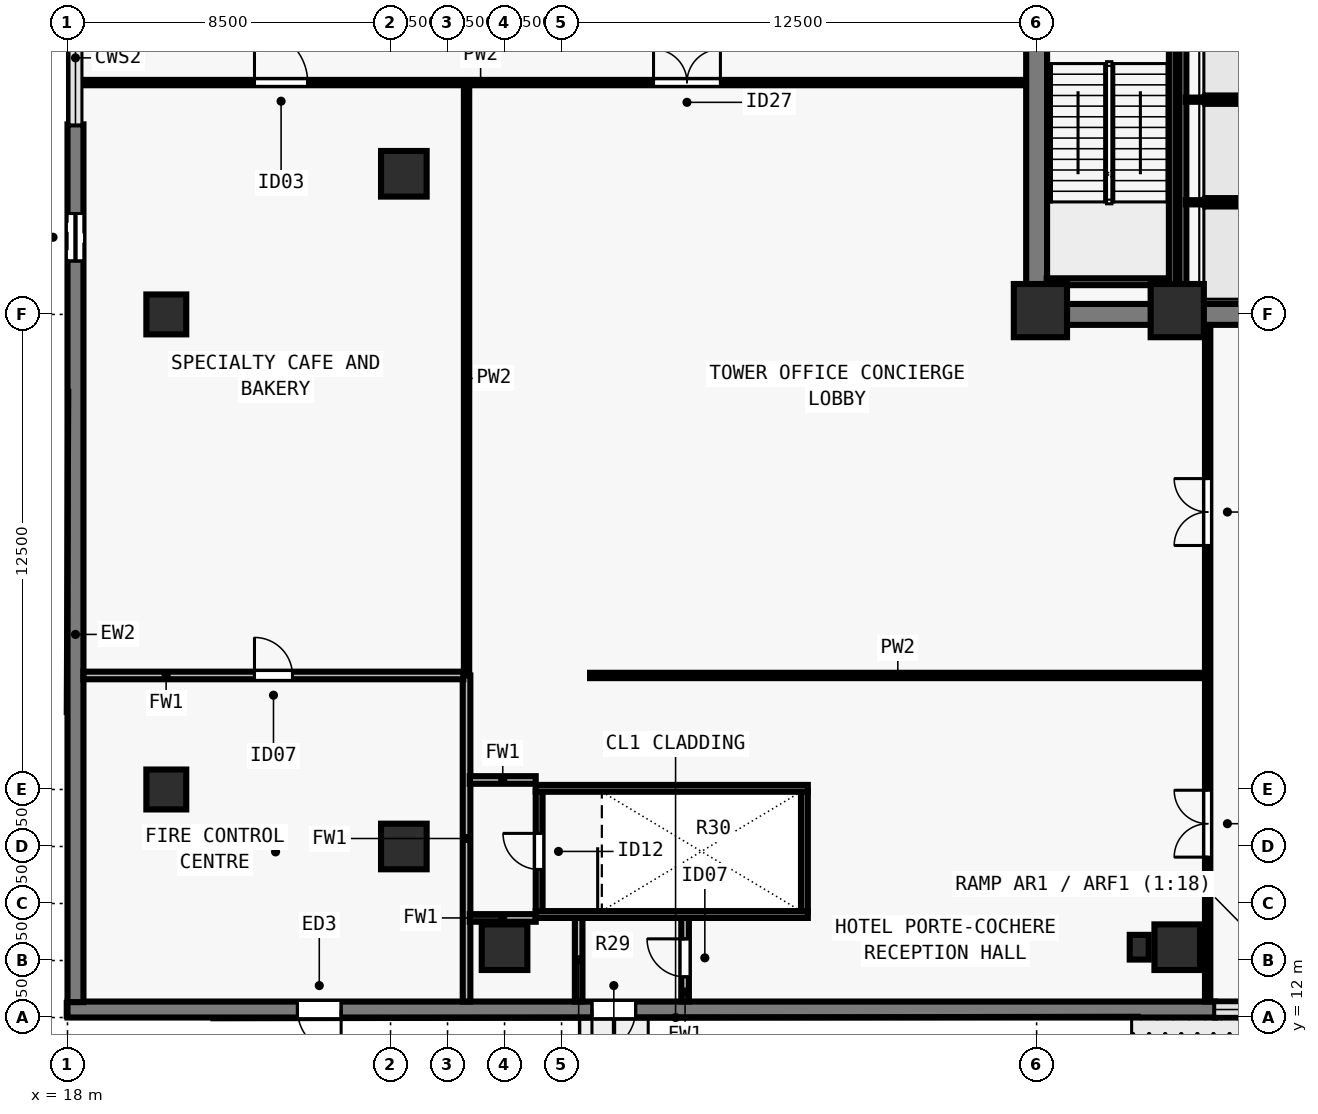
"""IFC4 building model, lengths in metres.
Left out: names, types, materials, properties, quantities, classifications, styles, units other than length and angle.
Written with IfcOpenShell. Run it as: python <this file> out.ifc"""

import sys

from ifc_helpers import new_model, si_unit, direction, frame, frame_2d, origin, origin_2d, place, context, subcontext, project, spatial, rectangle, extrude, element, fill, save


model = new_model("IFC4")
c1 = context("Model", 3, precision=1e-05, world=origin(), true_north=direction((0.0, 1.0)))
c2 = subcontext(c1, "Body", "Model", "MODEL_VIEW")
j1 = project(units=[si_unit("LENGTHUNIT", "METRE"), si_unit("PLANEANGLEUNIT", "RADIAN")], contexts=[c1])
p1 = place(None, origin())
s1 = spatial("IfcSite", under=j1, at=p1, CompositionType="ELEMENT")
p2 = place(p1, origin())
s2 = spatial("IfcBuilding", under=s1, at=p2, CompositionType="ELEMENT")
p3 = place(p2, origin())
s3 = spatial("IfcBuildingStorey", under=s2, at=p3, CompositionType="ELEMENT", Elevation=0.0)
for number, where, z_axis, x_axis in (
    (1, (43.6, 30.6, 0.0), (0.0, 0.0, 1.0), (1.0, 0.0, 0.0)),
    (2, (47.2, 30.6, 0.0), (0.0, 0.0, 1.0), (1.0, 0.0, 0.0)),
):
    element("IfcColumn", number, at=place(p3, frame(where, z_axis=z_axis, x_axis=x_axis)), inside=s3, PredefinedType="COLUMN", context=c2, shape_type="SweptSolid", body=[
        extrude(rectangle(XDim=1.4, YDim=1.4, at=origin_2d()), origin(), (0.0, 0.0, 1.0), 5.0),
    ])
for number, where, z_axis, x_axis in (
    (3, (29.5, 13.85, 0.0), (0.0, 0.0, 1.0), (1.0, 0.0, 0.0)),
    (4, (47.2, 13.85, 0.0), (0.0, 0.0, 1.0), (1.0, 0.0, 0.0)),
    (5, (26.85, 34.2, 0.0), (0.0, 0.0, 1.0), (1.0, 0.0, 0.0)),
    (6, (26.85, 16.5, 0.0), (0.0, 0.0, 1.0), (1.0, 0.0, 0.0)),
):
    element("IfcColumn", number, at=place(p3, frame(where, z_axis=z_axis, x_axis=x_axis)), inside=s3, PredefinedType="COLUMN", context=c2, shape_type="SweptSolid", body=[
        extrude(rectangle(XDim=1.2, YDim=1.2, at=origin_2d()), origin(), (0.0, 0.0, 1.0), 5.0),
    ])
p4 = place(p3, frame((46.2, 13.85, 0.0), z_axis=(0.0, 0.0, 1.0), x_axis=(1.0, 0.0, 0.0)))
e7 = element("IfcColumn", 7, at=p4, inside=s3, PredefinedType="PILASTER", context=c2, shape_type="SweptSolid", body=[
    extrude(rectangle(XDim=0.5, YDim=0.65, at=origin_2d()), origin(), (0.0, 0.0, 1.0), 5.0),
])
for number, where, z_axis, x_axis in (
    (8, (20.6, 18.0, 0.0), (0.0, 0.0, 1.0), (1.0, 0.0, 0.0)),
    (9, (20.6, 30.5, 0.0), (0.0, 0.0, 1.0), (1.0, 0.0, 0.0)),
):
    element("IfcColumn", number, at=place(p3, frame(where, z_axis=z_axis, x_axis=x_axis)), inside=s3, PredefinedType="COLUMN", context=c2, shape_type="SweptSolid", body=[
        extrude(rectangle(XDim=1.05, YDim=1.05, at=origin_2d()), origin(), (0.0, 0.0, 1.0), 5.0),
    ])
p5 = place(p3, frame((55.8, 12.21, 0.0), z_axis=(0.0, 0.0, 1.0), x_axis=(-1.0, 0.0, 0.0)))
e10 = element("IfcWall", 10, at=p5, inside=s3, PredefinedType="SOLIDWALL", context=c2, shape_type="SweptSolid", body=[
    extrude(rectangle(XDim=7.6, YDim=0.42, at=frame_2d((3.8, 0.0))), origin(), (0.0, 0.0, 1.0), 2.85),
])
p6 = place(p5, frame((2.6, 0.0, 0.0)))
e11 = element("IfcOpeningElement", 11, at=p6, cuts=e10, PredefinedType="OPENING", context=c2, shape_type="SweptSolid", body=[
    extrude(rectangle(XDim=2.4, YDim=2.7, at=frame_2d((1.2, 1.35))), frame((0.0, 0.22, 0.0), z_axis=(0.0, -1.0, 0.0), x_axis=(1.0, 0.0, 0.0)), (0.0, 0.0, 1.0), 0.44),
])
p7 = place(p3, frame((48.2, 12.21, 0.0), z_axis=(0.0, 0.0, 1.0), x_axis=(-1.0, 0.0, 0.0)))
e12 = element("IfcWall", 12, at=p7, inside=s3, PredefinedType="SOLIDWALL", context=c2, shape_type="SweptSolid", body=[
    extrude(rectangle(XDim=30.2, YDim=0.42, at=frame_2d((15.1, 0.0))), origin(), (0.0, 0.0, 1.0), 4.7),
])
p8 = place(p7, frame((23.0, 0.0, 0.0)))
e13 = element("IfcOpeningElement", 13, at=p8, cuts=e12, PredefinedType="OPENING", context=c2, shape_type="SweptSolid", body=[
    extrude(rectangle(XDim=1.15, YDim=2.15, at=frame_2d((0.575, 1.075))), frame((0.0, 0.22, 0.0), z_axis=(0.0, -1.0, 0.0), x_axis=(1.0, 0.0, 0.0)), (0.0, 0.0, 1.0), 0.44),
])
p9 = place(p7, frame((15.25, 0.0, 0.0)))
e14 = element("IfcOpeningElement", 14, at=p9, cuts=e12, PredefinedType="OPENING", context=c2, shape_type="SweptSolid", body=[
    extrude(rectangle(XDim=1.15, YDim=2.15, at=frame_2d((0.575, 1.075))), frame((0.0, 0.22, 0.0), z_axis=(0.0, -1.0, 0.0), x_axis=(1.0, 0.0, 0.0)), (0.0, 0.0, 1.0), 0.44),
])
p10 = place(p3, frame((18.21, 12.405, 0.0), z_axis=(0.0, 0.0, 1.0), x_axis=(0.0, 1.0, 0.0)))
e15 = element("IfcWall", 15, at=p10, inside=s3, PredefinedType="SOLIDWALL", context=c2, shape_type="SweptSolid", body=[
    extrude(rectangle(XDim=23.095, YDim=0.42, at=frame_2d((11.547, 0.0))), origin(), (0.0, 0.0, 1.0), 4.7),
])
p11 = place(p10, frame((19.5, 0.0, 0.0)))
e16 = element("IfcOpeningElement", 16, at=p11, cuts=e15, PredefinedType="OPENING", context=c2, shape_type="SweptSolid", body=[
    extrude(rectangle(XDim=1.25, YDim=2.15, at=frame_2d((0.625, 1.075))), frame((0.0, 0.22, 0.0), z_axis=(0.0, -1.0, 0.0), x_axis=(1.0, 0.0, 0.0)), (0.0, 0.0, 1.0), 0.44),
])
p12 = place(p3, frame((43.225, 30.5, 0.0), z_axis=(0.0, 0.0, 1.0), x_axis=(1.0, 0.0, 0.0)))
e17 = element("IfcWall", 17, at=p12, inside=s3, PredefinedType="SHEAR", context=c2, shape_type="SweptSolid", body=[
    extrude(rectangle(XDim=17.55, YDim=0.55, at=frame_2d((8.775, 0.0))), origin(), (0.0, 0.0, 1.0), 4.7),
])
p13 = place(p3, frame((43.5, 30.765, 0.0), z_axis=(0.0, 0.0, 1.0), x_axis=(0.0, 1.0, 0.0)))
e18 = element("IfcWall", 18, at=p13, inside=s3, PredefinedType="SHEAR", context=c2, shape_type="SweptSolid", body=[
    extrude(rectangle(XDim=7.985, YDim=0.55, at=frame_2d((3.993, 0.0))), origin(), (0.0, 0.0, 1.0), 4.7),
])
p14 = place(p3, frame((47.35, 30.76, 0.0), z_axis=(0.0, 0.0, 1.0), x_axis=(0.0, 1.0, 0.0)))
e19 = element("IfcWall", 19, at=p14, inside=s3, PredefinedType="SOLIDWALL", context=c2, shape_type="SweptSolid", body=[
    extrude(rectangle(XDim=7.855, YDim=0.18, at=frame_2d((3.927, 0.0))), origin(), (0.0, 0.0, 1.0), 4.7),
])
for number, where, z_axis, x_axis in (
    (20, (47.425, 33.45, 0.0), (0.0, 0.0, 1.0), (1.0, 0.0, 0.0)),
    (21, (47.425, 36.15, 0.0), (0.0, 0.0, 1.0), (1.0, 0.0, 0.0)),
):
    element("IfcWall", number, at=place(p3, frame(where, z_axis=z_axis, x_axis=x_axis)), inside=s3, PredefinedType="PARTITIONING", context=c2, shape_type="SweptSolid", body=[
        extrude(rectangle(XDim=2.79, YDim=0.11, at=frame_2d((1.395, 0.0))), origin(), (0.0, 0.0, 1.0), 4.7),
    ])
p15 = place(p3, frame((48.0, 12.42, 0.0), z_axis=(0.0, 0.0, 1.0), x_axis=(0.0, 1.0, 0.0)))
e22 = element("IfcWall", 22, at=p15, inside=s3, PredefinedType="PARTITIONING", context=c2, shape_type="SweptSolid", body=[
    extrude(rectangle(XDim=17.8, YDim=0.14, at=frame_2d((8.9, 0.0))), origin(), (0.0, 0.0, 1.0), 4.7),
])
p16 = place(p15, frame((3.8, 0.0, 0.0)))
e23 = element("IfcOpeningElement", 23, at=p16, cuts=e22, PredefinedType="OPENING", context=c2, shape_type="SweptSolid", body=[
    extrude(rectangle(XDim=1.76, YDim=2.2, at=frame_2d((0.88, 1.1))), frame((0.0, 0.08, 0.0), z_axis=(0.0, -1.0, 0.0), x_axis=(1.0, 0.0, 0.0)), (0.0, 0.0, 1.0), 0.16),
])
p17 = place(p15, frame((12.0, 0.0, 0.0)))
e24 = element("IfcOpeningElement", 24, at=p17, cuts=e22, PredefinedType="OPENING", context=c2, shape_type="SweptSolid", body=[
    extrude(rectangle(XDim=1.76, YDim=2.2, at=frame_2d((0.88, 1.1))), frame((0.0, 0.08, 0.0), z_axis=(0.0, -1.0, 0.0), x_axis=(1.0, 0.0, 0.0)), (0.0, 0.0, 1.0), 0.16),
])
p18 = place(p3, frame((18.42, 36.6, 0.0), z_axis=(0.0, 0.0, 1.0), x_axis=(1.0, 0.0, 0.0)))
e25 = element("IfcWall", 25, at=p18, inside=s3, PredefinedType="PARTITIONING", context=c2, shape_type="SweptSolid", body=[
    extrude(rectangle(XDim=24.8, YDim=0.14, at=frame_2d((12.4, 0.0))), origin(), (0.0, 0.0, 1.0), 4.7),
])
p19 = place(p18, frame((4.5, 0.0, 0.0)))
e26 = element("IfcOpeningElement", 26, at=p19, cuts=e25, PredefinedType="OPENING", context=c2, shape_type="SweptSolid", body=[
    extrude(rectangle(XDim=1.4, YDim=2.2, at=frame_2d((0.7, 1.1))), frame((0.0, 0.08, 0.0), z_axis=(0.0, -1.0, 0.0), x_axis=(1.0, 0.0, 0.0)), (0.0, 0.0, 1.0), 0.16),
])
p20 = place(p18, frame((15.0, 0.0, 0.0)))
e27 = element("IfcOpeningElement", 27, at=p20, cuts=e25, PredefinedType="OPENING", context=c2, shape_type="SweptSolid", body=[
    extrude(rectangle(XDim=1.76, YDim=2.2, at=frame_2d((0.88, 1.1))), frame((0.0, 0.08, 0.0), z_axis=(0.0, -1.0, 0.0), x_axis=(1.0, 0.0, 0.0)), (0.0, 0.0, 1.0), 0.16),
])
p21 = place(p3, frame((28.5, 12.42, 0.0), z_axis=(0.0, 0.0, 1.0), x_axis=(0.0, 1.0, 0.0)))
e28 = element("IfcWall", 28, at=p21, inside=s3, PredefinedType="SOLIDWALL", context=c2, shape_type="SweptSolid", body=[
    extrude(rectangle(XDim=8.58, YDim=0.2, at=frame_2d((4.29, 0.0))), origin(), (0.0, 0.0, 1.0), 4.7),
])
p22 = place(p3, frame((18.42, 21.0, 0.0), z_axis=(0.0, 0.0, 1.0), x_axis=(1.0, 0.0, 0.0)))
e29 = element("IfcWall", 29, at=p22, inside=s3, PredefinedType="SOLIDWALL", context=c2, shape_type="SweptSolid", body=[
    extrude(rectangle(XDim=9.995, YDim=0.2, at=frame_2d((4.998, 0.0))), origin(), (0.0, 0.0, 1.0), 4.7),
])
p23 = place(p22, frame((4.5, 0.0, 0.0)))
e30 = element("IfcOpeningElement", 30, at=p23, cuts=e29, PredefinedType="OPENING", context=c2, shape_type="SweptSolid", body=[
    extrude(rectangle(XDim=1.0, YDim=2.15, at=frame_2d((0.5, 1.075))), frame((0.0, 0.11, 0.0), z_axis=(0.0, -1.0, 0.0), x_axis=(1.0, 0.0, 0.0)), (0.0, 0.0, 1.0), 0.22),
])
p24 = place(p3, frame((31.45, 12.42, 0.0), z_axis=(0.0, 0.0, 1.0), x_axis=(0.0, 1.0, 0.0)))
e31 = element("IfcWall", 31, at=p24, inside=s3, PredefinedType="SOLIDWALL", context=c2, shape_type="SweptSolid", body=[
    extrude(rectangle(XDim=2.2, YDim=0.2, at=frame_2d((1.1, 0.0))), origin(), (0.0, 0.0, 1.0), 4.7),
])
p25 = place(p3, frame((28.585, 14.62, 0.0), z_axis=(0.0, 0.0, 1.0), x_axis=(1.0, 0.0, 0.0)))
e32 = element("IfcWall", 32, at=p25, inside=s3, PredefinedType="SOLIDWALL", context=c2, shape_type="SweptSolid", body=[
    extrude(rectangle(XDim=1.735, YDim=0.2, at=frame_2d((0.868, 0.0))), origin(), (0.0, 0.0, 1.0), 4.7),
])
p26 = place(p3, frame((34.25, 12.42, 0.0), z_axis=(0.0, 0.0, 1.0), x_axis=(0.0, 1.0, 0.0)))
e33 = element("IfcWall", 33, at=p26, inside=s3, PredefinedType="SOLIDWALL", context=c2, shape_type="SweptSolid", body=[
    extrude(rectangle(XDim=2.2, YDim=0.2, at=frame_2d((1.1, 0.0))), origin(), (0.0, 0.0, 1.0), 4.7),
])
p27 = place(p26, frame((0.65, 0.0, 0.0)))
e34 = element("IfcOpeningElement", 34, at=p27, cuts=e33, PredefinedType="OPENING", context=c2, shape_type="SweptSolid", body=[
    extrude(rectangle(XDim=1.0, YDim=2.15, at=frame_2d((0.5, 1.075))), frame((0.0, 0.11, 0.0), z_axis=(0.0, -1.0, 0.0), x_axis=(1.0, 0.0, 0.0)), (0.0, 0.0, 1.0), 0.22),
])
p28 = place(p3, frame((28.585, 18.25, 0.0), z_axis=(0.0, 0.0, 1.0), x_axis=(1.0, 0.0, 0.0)))
e35 = element("IfcWall", 35, at=p28, inside=s3, PredefinedType="SOLIDWALL", context=c2, shape_type="SweptSolid", body=[
    extrude(rectangle(XDim=1.735, YDim=0.2, at=frame_2d((0.868, 0.0))), origin(), (0.0, 0.0, 1.0), 4.218),
])
p29 = place(p3, frame((28.5, 21.085, 0.0), z_axis=(0.0, 0.0, 1.0), x_axis=(0.0, 1.0, 0.0)))
e36 = element("IfcWall", 36, at=p29, inside=s3, PredefinedType="PARTITIONING", context=c2, shape_type="SweptSolid", body=[
    extrude(rectangle(XDim=15.46, YDim=0.14, at=frame_2d((7.73, 0.0))), origin(), (0.0, 0.0, 1.0), 4.7),
])
p30 = place(p3, frame((31.75, 21.0, 0.0), z_axis=(0.0, 0.0, 1.0), x_axis=(1.0, 0.0, 0.0)))
e37 = element("IfcWall", 37, at=p30, inside=s3, PredefinedType="PARTITIONING", context=c2, shape_type="SweptSolid", body=[
    extrude(rectangle(XDim=16.195, YDim=0.14, at=frame_2d((8.098, 0.0))), origin(), (0.0, 0.0, 1.0), 4.218),
])
p31 = place(p3, frame((43.765, 31.36, 0.0), z_axis=(0.0, 0.0, 1.0), x_axis=(1.0, 0.0, 0.0)))
e38 = element("IfcWall", 38, at=p31, inside=s3, PredefinedType="SOLIDWALL", context=c2, shape_type="SweptSolid", body=[
    extrude(rectangle(XDim=3.23, YDim=0.18, at=frame_2d((1.615, 0.0))), origin(), (0.0, 0.0, 1.0), 4.7),
])
p32 = place(p3, frame((47.07, 38.78, 0.0), z_axis=(0.0, 0.0, 1.0), x_axis=(0.0, -1.0, 0.0)))
e39 = element("IfcWall", 39, at=p32, inside=s3, PredefinedType="SOLIDWALL", context=c2, shape_type="SweptSolid", body=[
    extrude(rectangle(XDim=8.017, YDim=0.18, at=frame_2d((4.009, 0.0))), origin(), (0.0, 0.0, 1.0), 4.7),
])
p33 = place(p3, frame((30.41, 14.785, 0.0), z_axis=(0.0, 0.0, 1.0), x_axis=(0.0, 1.0, 0.0)))
e40 = element("IfcWall", 40, at=p33, inside=s3, PredefinedType="SOLIDWALL", context=c2, shape_type="SweptSolid", body=[
    extrude(rectangle(XDim=3.17, YDim=0.18, at=frame_2d((1.585, 0.0))), origin(), (0.0, 0.0, 1.0), 4.7),
])
p34 = place(p33, frame((1.11, 0.0, 0.0)))
e41 = element("IfcOpeningElement", 41, at=p34, cuts=e40, PredefinedType="OPENING", context=c2, shape_type="SweptSolid", body=[
    extrude(rectangle(XDim=0.95, YDim=2.15, at=frame_2d((0.475, 1.075))), frame((0.0, 0.1, 0.0), z_axis=(0.0, -1.0, 0.0), x_axis=(1.0, 0.0, 0.0)), (0.0, 0.0, 1.0), 0.2),
])
p35 = place(p3, frame((37.39, 14.785, 0.0), z_axis=(0.0, 0.0, 1.0), x_axis=(0.0, 1.0, 0.0)))
e42 = element("IfcWall", 42, at=p35, inside=s3, PredefinedType="SOLIDWALL", context=c2, shape_type="SweptSolid", body=[
    extrude(rectangle(XDim=3.17, YDim=0.18, at=frame_2d((1.585, 0.0))), origin(), (0.0, 0.0, 1.0), 4.7),
])
for number, where, z_axis, x_axis in (
    (43, (30.32, 14.71, 0.0), (0.0, 0.0, 1.0), (1.0, 0.0, 0.0)),
    (44, (30.32, 18.03, 0.0), (0.0, 0.0, 1.0), (1.0, 0.0, 0.0)),
):
    element("IfcWall", number, at=place(p3, frame(where, z_axis=z_axis, x_axis=x_axis)), inside=s3, PredefinedType="SOLIDWALL", context=c2, shape_type="SweptSolid", body=[
        extrude(rectangle(XDim=7.16, YDim=0.18, at=frame_2d((3.58, 0.0))), origin(), (0.0, 0.0, 1.0), 4.7),
    ])
p36 = place(p8, origin())
e45 = element("IfcDoor", 45, at=p36, inside=s3, OperationType="SINGLE_SWING_LEFT", PredefinedType="DOOR", context=c2, shape_type="SweptSolid", body=[
    extrude(rectangle(XDim=1.15, YDim=2.15, at=frame_2d((0.575, 1.075))), frame((0.0, 0.025, 0.0), z_axis=(0.0, -1.0, 0.0), x_axis=(1.0, 0.0, 0.0)), (0.0, 0.0, 1.0), 0.05),
])
fill(e13, e45)
p37 = place(p9, origin())
e46 = element("IfcDoor", 46, at=p37, inside=s3, OperationType="SINGLE_SWING_RIGHT", PredefinedType="DOOR", context=c2, shape_type="SweptSolid", body=[
    extrude(rectangle(XDim=1.15, YDim=2.15, at=frame_2d((0.575, 1.075))), frame((0.0, 0.025, 0.0), z_axis=(0.0, -1.0, 0.0), x_axis=(1.0, 0.0, 0.0)), (0.0, 0.0, 1.0), 0.05),
])
fill(e14, e46)
p38 = place(p11, origin())
e47 = element("IfcDoor", 47, at=p38, inside=s3, OperationType="SINGLE_SWING_RIGHT", PredefinedType="GATE", context=c2, shape_type="SweptSolid", body=[
    extrude(rectangle(XDim=1.25, YDim=2.15, at=frame_2d((0.625, 1.075))), frame((0.0, 0.025, 0.0), z_axis=(0.0, -1.0, 0.0), x_axis=(1.0, 0.0, 0.0)), (0.0, 0.0, 1.0), 0.05),
])
fill(e16, e47)
p39 = place(p23, origin())
e48 = element("IfcDoor", 48, at=p39, inside=s3, OperationType="SINGLE_SWING_LEFT", PredefinedType="DOOR", context=c2, shape_type="SweptSolid", body=[
    extrude(rectangle(XDim=1.0, YDim=2.15, at=frame_2d((0.5, 1.075))), frame((0.0, 0.025, 0.0), z_axis=(0.0, -1.0, 0.0), x_axis=(1.0, 0.0, 0.0)), (0.0, 0.0, 1.0), 0.05),
])
fill(e30, e48)
p40 = place(p27, origin())
e49 = element("IfcDoor", 49, at=p40, inside=s3, OperationType="SINGLE_SWING_RIGHT", PredefinedType="DOOR", context=c2, shape_type="SweptSolid", body=[
    extrude(rectangle(XDim=1.0, YDim=2.15, at=frame_2d((0.5, 1.075))), frame((0.0, 0.025, 0.0), z_axis=(0.0, -1.0, 0.0), x_axis=(1.0, 0.0, 0.0)), (0.0, 0.0, 1.0), 0.05),
])
fill(e34, e49)
p41 = place(p16, origin())
e50 = element("IfcDoor", 50, at=p41, inside=s3, OperationType="DOUBLE_DOOR_SINGLE_SWING", PredefinedType="DOOR", context=c2, shape_type="SweptSolid", body=[
    extrude(rectangle(XDim=1.76, YDim=2.2, at=frame_2d((0.88, 1.1))), frame((0.0, 0.025, 0.0), z_axis=(0.0, -1.0, 0.0), x_axis=(1.0, 0.0, 0.0)), (0.0, 0.0, 1.0), 0.05),
])
fill(e23, e50)
p42 = place(p17, origin())
e51 = element("IfcDoor", 51, at=p42, inside=s3, OperationType="DOUBLE_DOOR_SINGLE_SWING", PredefinedType="DOOR", context=c2, shape_type="SweptSolid", body=[
    extrude(rectangle(XDim=1.76, YDim=2.2, at=frame_2d((0.88, 1.1))), frame((0.0, 0.025, 0.0), z_axis=(0.0, -1.0, 0.0), x_axis=(1.0, 0.0, 0.0)), (0.0, 0.0, 1.0), 0.05),
])
fill(e24, e51)
p43 = place(p19, origin())
e52 = element("IfcDoor", 52, at=p43, inside=s3, OperationType="SINGLE_SWING_LEFT", PredefinedType="DOOR", context=c2, shape_type="SweptSolid", body=[
    extrude(rectangle(XDim=1.4, YDim=2.2, at=frame_2d((0.7, 1.1))), frame((0.0, 0.025, 0.0), z_axis=(0.0, -1.0, 0.0), x_axis=(1.0, 0.0, 0.0)), (0.0, 0.0, 1.0), 0.05),
])
fill(e26, e52)
p44 = place(p20, origin())
e53 = element("IfcDoor", 53, at=p44, inside=s3, OperationType="DOUBLE_DOOR_SINGLE_SWING", PredefinedType="DOOR", context=c2, shape_type="SweptSolid", body=[
    extrude(rectangle(XDim=1.76, YDim=2.2, at=frame_2d((0.88, 1.1))), frame((0.0, 0.025, 0.0), z_axis=(0.0, -1.0, 0.0), x_axis=(1.0, 0.0, 0.0)), (0.0, 0.0, 1.0), 0.05),
])
fill(e27, e53)
p45 = place(p34, origin())
e54 = element("IfcDoor", 54, at=p45, inside=s3, OperationType="SINGLE_SWING_RIGHT", PredefinedType="DOOR", context=c2, shape_type="SweptSolid", body=[
    extrude(rectangle(XDim=0.95, YDim=2.15, at=frame_2d((0.475, 1.075))), frame((0.0, 0.025, 0.0), z_axis=(0.0, -1.0, 0.0), x_axis=(1.0, 0.0, 0.0)), (0.0, 0.0, 1.0), 0.05),
])
fill(e41, e54)
save(model, sys.argv[1])
